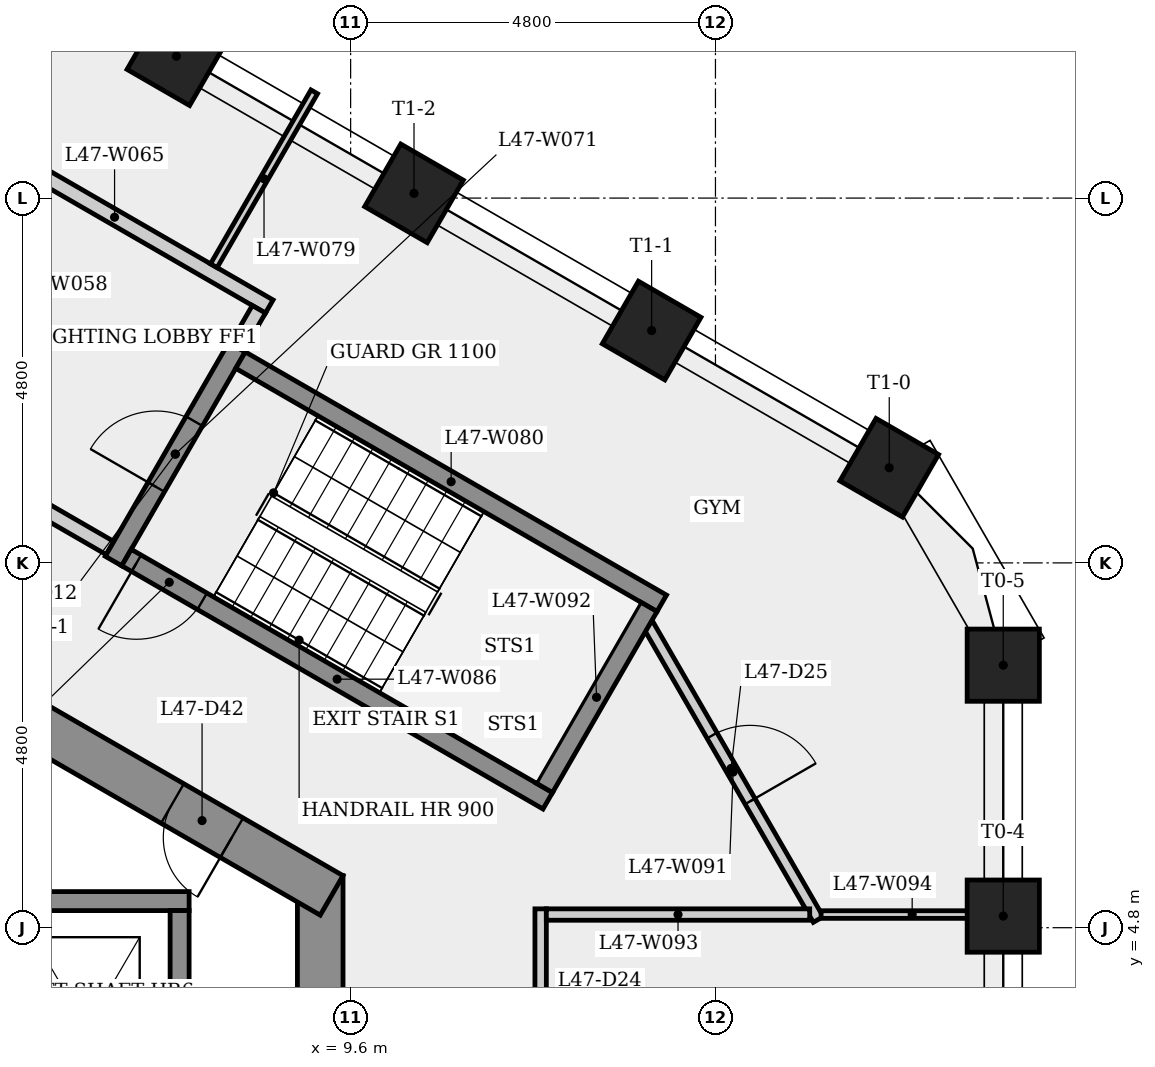
"""IFC4 building model, lengths in metres.
Left out: names, types, materials, properties, quantities, classifications, styles, units other than length and angle.
Written with IfcOpenShell. Run it as: python <this file> out.ifc"""

import sys

from ifc_helpers import new_model, si_unit, direction, frame, frame_2d, origin, origin_2d, place, context, subcontext, project, spatial, rectangle, extrude, element, fill, save


model = new_model("IFC4")
c1 = context("Model", 3, precision=1e-05, world=origin(), true_north=direction((0.0, 1.0)))
c2 = subcontext(c1, "Body", "Model", "MODEL_VIEW")
j1 = project(units=[si_unit("LENGTHUNIT", "METRE"), si_unit("PLANEANGLEUNIT", "RADIAN")], contexts=[c1])
p1 = place(None, origin())
s1 = spatial("IfcSite", under=j1, at=p1, CompositionType="ELEMENT")
p2 = place(p1, origin())
s2 = spatial("IfcBuilding", under=s1, at=p2, CompositionType="ELEMENT")
p3 = place(p2, frame((0.0, 0.0, 176.5)))
s3 = spatial("IfcBuildingStorey", under=s2, at=p3, CompositionType="ELEMENT", Elevation=176.5)
p4 = place(p3, frame((9.2, -5.485, 0.0), z_axis=(0.0, 0.0, 1.0), x_axis=(0.0, 1.0, 0.0)))
e1 = element("IfcWall", 1, at=p4, inside=s3, PredefinedType="SHEAR", context=c2, shape_type="SweptSolid", body=[
    extrude(rectangle(XDim=10.97, YDim=0.6, at=frame_2d((5.485, 0.0))), origin(), (0.0, 0.0, 1.0), 3.4),
])
p5 = place(p4, frame((4.685, 0.0, 0.0)))
e2 = element("IfcOpeningElement", 2, at=p5, cuts=e1, PredefinedType="OPENING", context=c2, shape_type="SweptSolid", body=[
    extrude(rectangle(XDim=1.6, YDim=2.1, at=frame_2d((0.8, 1.05))), frame((0.0, 0.31, 0.0), z_axis=(0.0, -1.0, 0.0), x_axis=(1.0, 0.0, 0.0)), (0.0, 0.0, 1.0), 0.62),
])
p6 = place(p3, frame((9.35, 5.225, 0.0), z_axis=(0.0, 0.0, 1.0), x_axis=(-0.866023993627, 0.500002442456, 0.0)))
e3 = element("IfcWall", 3, at=p6, inside=s3, PredefinedType="SHEAR", context=c2, shape_type="SweptSolid", body=[
    extrude(rectangle(XDim=10.97, YDim=0.6, at=frame_2d((5.485, 0.0))), origin(), (0.0, 0.0, 1.0), 3.4),
])
p7 = place(p6, frame((8.325, 0.0, 0.0)))
e4 = element("IfcOpeningElement", 4, at=p7, cuts=e3, PredefinedType="OPENING", context=c2, shape_type="SweptSolid", body=[
    extrude(rectangle(XDim=0.9, YDim=2.1, at=frame_2d((0.45, 1.05))), frame((0.0, 0.31, 0.0), z_axis=(0.0, -1.0, 0.0), x_axis=(1.0, 0.0, 0.0)), (0.0, 0.0, 1.0), 0.62),
])
p8 = place(p6, frame((1.518, 0.0, 0.0)))
e5 = element("IfcOpeningElement", 5, at=p8, cuts=e3, PredefinedType="OPENING", context=c2, shape_type="SweptSolid", body=[
    extrude(rectangle(XDim=0.9, YDim=2.1, at=frame_2d((0.45, 1.05))), frame((0.0, 0.31, 0.0), z_axis=(0.0, -1.0, 0.0), x_axis=(1.0, 0.0, 0.0)), (0.0, 0.0, 1.0), 0.62),
])
for number, where, z_axis, x_axis in (
    (6, (18.187, 4.952, 0.0), (0.0, 0.0, 1.0), (1.0, 0.0, 0.0)),
    (7, (18.187, 8.254, 0.0), (0.0, 0.0, 1.0), (1.0, 0.0, 0.0)),
    (8, (16.687, 10.852, 0.0), (0.0, 0.0, 1.0), (0.5, 0.866, 0.0)),
    (9, (13.56, 12.657, 0.0), (0.0, 0.0, 1.0), (0.5, 0.866, 0.0)),
    (10, (10.434, 14.462, 0.0), (0.0, 0.0, 1.0), (0.5, 0.866, 0.0)),
    (11, (7.308, 16.267, 0.0), (0.0, 0.0, 1.0), (0.5, 0.866, 0.0)),
):
    element("IfcColumn", number, at=place(p3, frame(where, z_axis=z_axis, x_axis=x_axis)), inside=s3, PredefinedType="COLUMN", context=c2, shape_type="SweptSolid", body=[
        extrude(rectangle(XDim=0.95, YDim=0.95, at=origin_2d()), origin(), (0.0, 0.0, 1.0), 3.4),
    ])
p9 = place(p3, frame((-7.225, 5.15, 0.0), z_axis=(0.0, 0.0, 1.0), x_axis=(1.0, 0.0, 0.0)))
e12 = element("IfcWall", 12, at=p9, inside=s3, PredefinedType="SHEAR", context=c2, shape_type="SweptSolid", body=[
    extrude(rectangle(XDim=14.7, YDim=0.25, at=frame_2d((7.35, 0.0))), origin(), (0.0, 0.0, 1.0), 3.05),
])
p10 = place(p3, frame((4.459, 15.323, 0.0), z_axis=(0.0, 0.0, 1.0), x_axis=(0.866016039709, -0.500016218704, 0.0)))
e13 = element("IfcWall", 13, at=p10, inside=s3, PredefinedType="PARTITIONING", context=c2, shape_type="SweptSolid", body=[
    extrude(rectangle(XDim=4.7, YDim=0.2, at=frame_2d((2.35, 0.0))), origin(), (0.0, 0.0, 1.0), 3.05),
])
p11 = place(p3, frame((6.435, 9.795, 0.0), z_axis=(0.0, 0.0, 1.0), x_axis=(-0.866012907634, 0.500021643343, 0.0)))
e14 = element("IfcWall", 14, at=p11, inside=s3, PredefinedType="PARTITIONING", context=c2, shape_type="SweptSolid", body=[
    extrude(rectangle(XDim=4.45, YDim=0.2, at=frame_2d((2.225, 0.0))), origin(), (0.0, 0.0, 1.0), 3.05),
])
p12 = place(p11, frame((1.675, 0.0, 0.0)))
e15 = element("IfcOpeningElement", 15, at=p12, cuts=e14, PredefinedType="OPENING", context=c2, shape_type="SweptSolid", body=[
    extrude(rectangle(XDim=1.1, YDim=2.1, at=frame_2d((0.55, 1.05))), frame((0.0, 0.11, 0.0), z_axis=(0.0, -1.0, 0.0), x_axis=(1.0, 0.0, 0.0)), (0.0, 0.0, 1.0), 0.22),
])
p13 = place(p3, frame((6.48, 9.624, 0.0), z_axis=(0.0, 0.0, 1.0), x_axis=(0.500017246033, 0.866015446554, 0.0)))
e16 = element("IfcWall", 16, at=p13, inside=s3, PredefinedType="SHEAR", context=c2, shape_type="SweptSolid", body=[
    extrude(rectangle(XDim=3.25, YDim=0.25, at=frame_2d((1.625, 0.0))), origin(), (0.0, 0.0, 1.0), 3.05),
])
p14 = place(p13, frame((1.125, 0.0, 0.0)))
e17 = element("IfcOpeningElement", 17, at=p14, cuts=e16, PredefinedType="OPENING", context=c2, shape_type="SweptSolid", body=[
    extrude(rectangle(XDim=1.0, YDim=2.1, at=frame_2d((0.5, 1.05))), frame((0.0, 0.135, 0.0), z_axis=(0.0, -1.0, 0.0), x_axis=(1.0, 0.0, 0.0)), (0.0, 0.0, 1.0), 0.27),
])
p15 = place(p3, frame((7.35, 5.025, 0.0), z_axis=(0.0, 0.0, 1.0), x_axis=(0.0, -1.0, 0.0)))
e18 = element("IfcWall", 18, at=p15, inside=s3, PredefinedType="SHEAR", context=c2, shape_type="SweptSolid", body=[
    extrude(rectangle(XDim=3.1, YDim=0.25, at=frame_2d((1.55, 0.0))), origin(), (0.0, 0.0, 1.0), 3.4),
])
p16 = place(p3, frame((7.8, 13.51, 0.0), z_axis=(0.0, 0.0, 1.0), x_axis=(0.50000507839, 0.866022471755, 0.0)))
e19 = element("IfcWall", 19, at=p16, inside=s3, PredefinedType="PARTITIONING", context=c2, shape_type="SweptSolid", body=[
    extrude(rectangle(XDim=2.642, YDim=0.1, at=frame_2d((1.321, 0.0))), origin(), (0.0, 0.0, 1.0), 3.05),
])
p17 = place(p3, frame((8.151, 12.268, 0.0), z_axis=(0.0, 0.0, 1.0), x_axis=(0.866025499775, -0.499999833739, 0.0)))
e20 = element("IfcWall", 20, at=p17, inside=s3, PredefinedType="SHEAR", context=c2, shape_type="SweptSolid", body=[
    extrude(rectangle(XDim=6.4, YDim=0.25, at=frame_2d((3.2, 0.0))), origin(), (0.0, 0.0, 1.0), 3.05),
])
p18 = place(p3, frame((8.393, 12.937, 0.0), z_axis=(0.0, 0.0, 1.0), x_axis=(-0.500065409566, -0.86598763626, 0.0)))
e21 = element("IfcWall", 21, at=p18, inside=s3, PredefinedType="PARTITIONING", context=c2, shape_type="SweptSolid", body=[
    extrude(rectangle(XDim=0.575, YDim=0.2, at=frame_2d((0.288, 0.0))), origin(), (0.0, 0.0, 1.0), 3.05),
])
p19 = place(p3, frame((12.194, 6.47, 0.0), z_axis=(0.0, 0.0, 1.0), x_axis=(-0.866025499775, 0.499999833739, 0.0)))
e22 = element("IfcWall", 22, at=p19, inside=s3, PredefinedType="SHEAR", context=c2, shape_type="SweptSolid", body=[
    extrude(rectangle(XDim=6.4, YDim=0.25, at=frame_2d((3.2, 0.0))), origin(), (0.0, 0.0, 1.0), 3.05),
])
p20 = place(p19, frame((5.25, 0.0, 0.0)))
e23 = element("IfcOpeningElement", 23, at=p20, cuts=e22, PredefinedType="OPENING", context=c2, shape_type="SweptSolid", body=[
    extrude(rectangle(XDim=1.0, YDim=2.1, at=frame_2d((0.5, 1.05))), frame((0.0, 0.135, 0.0), z_axis=(0.0, -1.0, 0.0), x_axis=(1.0, 0.0, 0.0)), (0.0, 0.0, 1.0), 0.27),
])
p21 = place(p3, frame((12.1, -4.898, 0.0), z_axis=(0.0, 0.0, 1.0), x_axis=(0.0, 1.0, 0.0)))
e24 = element("IfcWall", 24, at=p21, inside=s3, PredefinedType="PARTITIONING", context=c2, shape_type="SweptSolid", body=[
    extrude(rectangle(XDim=9.946, YDim=0.15, at=frame_2d((4.973, 0.0))), origin(), (0.0, 0.0, 1.0), 3.05),
])
p22 = place(p21, frame((1.105, 0.0, 0.0)))
e25 = element("IfcOpeningElement", 25, at=p22, cuts=e24, PredefinedType="OPENING", context=c2, shape_type="SweptSolid", body=[
    extrude(rectangle(XDim=1.0, YDim=2.1, at=frame_2d((0.5, 1.05))), frame((0.0, 0.085, 0.0), z_axis=(0.0, -1.0, 0.0), x_axis=(1.0, 0.0, 0.0)), (0.0, 0.0, 1.0), 0.17),
])
p23 = place(p21, frame((4.398, 0.0, 0.0)))
e26 = element("IfcOpeningElement", 26, at=p23, cuts=e24, PredefinedType="OPENING", context=c2, shape_type="SweptSolid", body=[
    extrude(rectangle(XDim=1.0, YDim=2.1, at=frame_2d((0.5, 1.05))), frame((0.0, 0.085, 0.0), z_axis=(0.0, -1.0, 0.0), x_axis=(1.0, 0.0, 0.0)), (0.0, 0.0, 1.0), 0.17),
])
p24 = place(p21, frame((7.713, 0.0, 0.0)))
e27 = element("IfcOpeningElement", 27, at=p24, cuts=e24, PredefinedType="OPENING", context=c2, shape_type="SweptSolid", body=[
    extrude(rectangle(XDim=1.0, YDim=2.1, at=frame_2d((0.5, 1.05))), frame((0.0, 0.085, 0.0), z_axis=(0.0, -1.0, 0.0), x_axis=(1.0, 0.0, 0.0)), (0.0, 0.0, 1.0), 0.17),
])
p25 = place(p3, frame((13.512, 8.788, 0.0), z_axis=(0.0, 0.0, 1.0), x_axis=(0.499989762656, -0.866031314237, 0.0)))
e28 = element("IfcWall", 28, at=p25, inside=s3, PredefinedType="PARTITIONING", context=c2, shape_type="SweptSolid", body=[
    extrude(rectangle(XDim=4.48, YDim=0.15, at=frame_2d((2.24, 0.0))), origin(), (0.0, 0.0, 1.0), 3.05),
])
p26 = place(p25, frame((1.685, 0.0, 0.0)))
e29 = element("IfcOpeningElement", 29, at=p26, cuts=e28, PredefinedType="OPENING", context=c2, shape_type="SweptSolid", body=[
    extrude(rectangle(XDim=1.0, YDim=2.1, at=frame_2d((0.5, 1.05))), frame((0.0, 0.085, 0.0), z_axis=(0.0, -1.0, 0.0), x_axis=(1.0, 0.0, 0.0)), (0.0, 0.0, 1.0), 0.17),
])
p27 = place(p3, frame((12.148, 6.641, 0.0), z_axis=(0.0, 0.0, 1.0), x_axis=(0.500034990121, 0.866005201286, 0.0)))
e30 = element("IfcWall", 30, at=p27, inside=s3, PredefinedType="SHEAR", context=c2, shape_type="SweptSolid", body=[
    extrude(rectangle(XDim=2.75, YDim=0.25, at=frame_2d((1.375, 0.0))), origin(), (0.0, 0.0, 1.0), 3.05),
])
p28 = place(p3, frame((15.64, 4.973, 0.0), z_axis=(0.0, 0.0, 1.0), x_axis=(-1.0, 0.0, 0.0)))
e31 = element("IfcWall", 31, at=p28, inside=s3, PredefinedType="PARTITIONING", context=c2, shape_type="SweptSolid", body=[
    extrude(rectangle(XDim=3.465, YDim=0.15, at=frame_2d((1.732, 0.0))), origin(), (0.0, 0.0, 1.0), 3.05),
])
p29 = place(p3, frame((15.79, 4.973, 0.0), z_axis=(0.0, 0.0, 1.0), x_axis=(1.0, 0.0, 0.0)))
e32 = element("IfcWall", 32, at=p29, inside=s3, PredefinedType="PARTITIONING", context=c2, shape_type="SweptSolid", body=[
    extrude(rectangle(XDim=2.396, YDim=0.1, at=frame_2d((1.198, 0.0))), origin(), (0.0, 0.0, 1.0), 3.05),
])
p30 = place(p20, origin())
e33 = element("IfcDoor", 33, at=p30, inside=s3, OperationType="SINGLE_SWING_RIGHT", PredefinedType="DOOR", context=c2, shape_type="SweptSolid", body=[
    extrude(rectangle(XDim=1.0, YDim=2.1, at=frame_2d((0.5, 1.05))), frame((0.0, 0.025, 0.0), z_axis=(0.0, -1.0, 0.0), x_axis=(1.0, 0.0, 0.0)), (0.0, 0.0, 1.0), 0.05),
])
fill(e23, e33)
p31 = place(p14, origin())
e34 = element("IfcDoor", 34, at=p31, inside=s3, OperationType="SINGLE_SWING_LEFT", PredefinedType="DOOR", context=c2, shape_type="SweptSolid", body=[
    extrude(rectangle(XDim=1.0, YDim=2.1, at=frame_2d((0.5, 1.05))), frame((0.0, 0.025, 0.0), z_axis=(0.0, -1.0, 0.0), x_axis=(1.0, 0.0, 0.0)), (0.0, 0.0, 1.0), 0.05),
])
fill(e17, e34)
p32 = place(p26, origin())
e35 = element("IfcDoor", 35, at=p32, inside=s3, OperationType="SINGLE_SWING_RIGHT", PredefinedType="DOOR", context=c2, shape_type="SweptSolid", body=[
    extrude(rectangle(XDim=1.0, YDim=2.1, at=frame_2d((0.5, 1.05))), frame((0.0, 0.025, 0.0), z_axis=(0.0, -1.0, 0.0), x_axis=(1.0, 0.0, 0.0)), (0.0, 0.0, 1.0), 0.05),
])
fill(e29, e35)
p33 = place(p8, origin())
e36 = element("IfcDoor", 36, at=p33, inside=s3, OperationType="SINGLE_SWING_LEFT", PredefinedType="DOOR", context=c2, shape_type="SweptSolid", body=[
    extrude(rectangle(XDim=0.9, YDim=2.1, at=frame_2d((0.45, 1.05))), frame((0.0, 0.025, 0.0), z_axis=(0.0, -1.0, 0.0), x_axis=(1.0, 0.0, 0.0)), (0.0, 0.0, 1.0), 0.05),
])
fill(e5, e36)
save(model, sys.argv[1])
